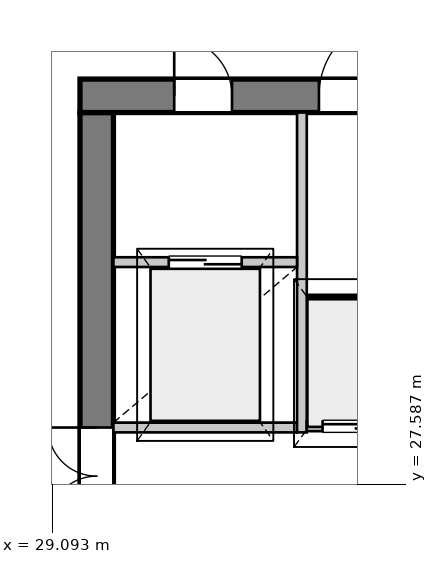
"""IFC4 building model, lengths in metres.
Left out: names, types, materials, properties, quantities, classifications, styles, units other than length and angle.
Written with IfcOpenShell. Run it as: python <this file> out.ifc"""

import sys

from ifc_helpers import new_model, si_unit, direction, frame, frame_2d, origin, place, context, subcontext, project, spatial, rectangle, extrude, source, transform, mapped, element, fill, save


model = new_model("IFC4")
c1 = context("Model", 3, precision=1e-05, world=origin(), true_north=direction((0.0, 1.0)))
c2 = subcontext(c1, "Body", "Model", "MODEL_VIEW")
j1 = project(units=[si_unit("LENGTHUNIT", "METRE"), si_unit("PLANEANGLEUNIT", "RADIAN")], contexts=[c1])
p1 = place(None, origin())
s1 = spatial("IfcSite", under=j1, at=p1, CompositionType="ELEMENT")
p2 = place(p1, origin())
s2 = spatial("IfcBuilding", under=s1, at=p2, CompositionType="ELEMENT")
p3 = place(p2, frame((0.0, 0.0, 167.9)))
s3 = spatial("IfcBuildingStorey", under=s2, at=p3, CompositionType="ELEMENT", Elevation=167.9)
p4 = place(p3, frame((29.825, 19.5, 0.0), z_axis=(0.0, 0.0, 1.0), x_axis=(0.0, 1.0, 0.0)))
e1 = element("IfcWall", 1, at=p4, inside=s3, PredefinedType="SHEAR", context=c2, shape_type="SweptSolid", body=[
    extrude(rectangle(XDim=14.2, YDim=0.55, at=frame_2d((7.1, 0.0))), origin(), (0.0, 0.0, 1.0), 3.33),
])
p5 = place(p4, frame((7.42, 0.0, 0.0)))
e2 = element("IfcOpeningElement", 2, at=p5, cuts=e1, PredefinedType="OPENING", context=c2, shape_type="SweptSolid", body=[
    extrude(rectangle(XDim=1.6, YDim=2.2, at=frame_2d((0.8, 1.1))), frame((0.0, 0.285, 0.0), z_axis=(0.0, -1.0, 0.0), x_axis=(1.0, 0.0, 0.0)), (0.0, 0.0, 1.0), 0.57),
])
p6 = place(p3, frame((29.55, 33.975, 0.0), z_axis=(0.0, 0.0, 1.0), x_axis=(1.0, 0.0, 0.0)))
e3 = element("IfcWall", 3, at=p6, inside=s3, PredefinedType="SHEAR", context=c2, shape_type="SweptSolid", body=[
    extrude(rectangle(XDim=16.9, YDim=0.55, at=frame_2d((8.45, 0.0))), origin(), (0.0, 0.0, 1.0), 3.33),
])
p7 = place(p6, frame((1.55, 0.0, 0.0)))
e4 = element("IfcOpeningElement", 4, at=p7, cuts=e3, PredefinedType="OPENING", context=c2, shape_type="SweptSolid", body=[
    extrude(rectangle(XDim=0.95, YDim=2.1, at=frame_2d((0.475, 1.05))), frame((0.0, 0.285, 0.0), z_axis=(0.0, -1.0, 0.0), x_axis=(1.0, 0.0, 0.0)), (0.0, 0.0, 1.0), 0.57),
])
p8 = place(p6, frame((3.93, 0.0, 0.0)))
e5 = element("IfcOpeningElement", 5, at=p8, cuts=e3, PredefinedType="OPENING", context=c2, shape_type="SweptSolid", body=[
    extrude(rectangle(XDim=1.32, YDim=2.2, at=frame_2d((0.66, 1.1))), frame((0.0, 0.285, 0.0), z_axis=(0.0, -1.0, 0.0), x_axis=(1.0, 0.0, 0.0)), (0.0, 0.0, 1.0), 0.57),
])
p9 = place(p3, frame((33.28, 30.6, 0.0), z_axis=(0.0, 0.0, 1.0), x_axis=(1.0, 0.0, 0.0)))
e6 = element("IfcWall", 6, at=p9, inside=s3, PredefinedType="PARTITIONING", context=c2, shape_type="SweptSolid", body=[
    extrude(rectangle(XDim=7.3, YDim=0.16, at=frame_2d((3.65, 0.0))), origin(), (0.0, 0.0, 1.0), 3.33),
])
p10 = place(p3, frame((30.1, 28.52, 0.0), z_axis=(0.0, 0.0, 1.0), x_axis=(1.0, 0.0, 0.0)))
e7 = element("IfcWall", 7, at=p10, inside=s3, PredefinedType="PARTITIONING", context=c2, shape_type="SweptSolid", body=[
    extrude(rectangle(XDim=3.02, YDim=0.16, at=frame_2d((1.51, 0.0))), origin(), (0.0, 0.0, 1.0), 3.33),
])
p11 = place(p3, frame((33.2, 28.44, 0.0), z_axis=(0.0, 0.0, 1.0), x_axis=(0.0, 1.0, 0.0)))
e8 = element("IfcWall", 8, at=p11, inside=s3, PredefinedType="PARTITIONING", context=c2, shape_type="SweptSolid", body=[
    extrude(rectangle(XDim=5.26, YDim=0.16, at=frame_2d((2.63, 0.0))), origin(), (0.0, 0.0, 1.0), 3.33),
])
p12 = place(p3, frame((30.1, 31.24, 0.0), z_axis=(0.0, 0.0, 1.0), x_axis=(1.0, 0.0, 0.0)))
e9 = element("IfcWall", 9, at=p12, inside=s3, PredefinedType="PARTITIONING", context=c2, shape_type="SweptSolid", body=[
    extrude(rectangle(XDim=3.02, YDim=0.16, at=frame_2d((1.51, 0.0))), origin(), (0.0, 0.0, 1.0), 3.33),
])
p13 = place(p12, frame((0.91, 0.0, 0.0)))
e10 = element("IfcOpeningElement", 10, at=p13, cuts=e9, PredefinedType="OPENING", context=c2, shape_type="SweptSolid", body=[
    extrude(rectangle(XDim=1.2, YDim=2.2, at=frame_2d((0.6, 1.1))), frame((0.0, 0.09, 0.0), z_axis=(0.0, -1.0, 0.0), x_axis=(1.0, 0.0, 0.0)), (0.0, 0.0, 1.0), 0.18),
])
p14 = place(p3, frame((33.28, 28.54, 0.0), z_axis=(0.0, 0.0, 1.0), x_axis=(1.0, 0.0, 0.0)))
e11 = element("IfcWall", 11, at=p14, inside=s3, PredefinedType="PARTITIONING", context=c2, shape_type="SweptSolid", body=[
    extrude(rectangle(XDim=12.62, YDim=0.16, at=frame_2d((6.31, 0.0))), origin(), (0.0, 0.0, 1.0), 3.33),
])
p15 = place(p14, frame((0.26, 0.0, 0.0)))
e12 = element("IfcOpeningElement", 12, at=p15, cuts=e11, PredefinedType="OPENING", context=c2, shape_type="SweptSolid", body=[
    extrude(rectangle(XDim=1.1, YDim=2.2, at=frame_2d((0.55, 1.1))), frame((0.0, 0.09, 0.0), z_axis=(0.0, -1.0, 0.0), x_axis=(1.0, 0.0, 0.0)), (0.0, 0.0, 1.0), 0.18),
])
p16 = place(p14, frame((2.01, 0.0, 0.0)))
e13 = element("IfcOpeningElement", 13, at=p16, cuts=e11, PredefinedType="OPENING", context=c2, shape_type="SweptSolid", body=[
    extrude(rectangle(XDim=1.1, YDim=2.2, at=frame_2d((0.55, 1.1))), frame((0.0, 0.09, 0.0), z_axis=(0.0, -1.0, 0.0), x_axis=(1.0, 0.0, 0.0)), (0.0, 0.0, 1.0), 0.18),
])
p17 = place(p14, frame((3.76, 0.0, 0.0)))
e14 = element("IfcOpeningElement", 14, at=p17, cuts=e11, PredefinedType="OPENING", context=c2, shape_type="SweptSolid", body=[
    extrude(rectangle(XDim=1.1, YDim=2.2, at=frame_2d((0.55, 1.1))), frame((0.0, 0.09, 0.0), z_axis=(0.0, -1.0, 0.0), x_axis=(1.0, 0.0, 0.0)), (0.0, 0.0, 1.0), 0.18),
])
m1 = source(origin(), c2, "Body", "SweptSolid", [
    extrude(rectangle(XDim=1.6, YDim=2.2, at=frame_2d((0.8, 1.1))), frame((0.0, 0.025, 0.0), z_axis=(0.0, -1.0, 0.0), x_axis=(1.0, 0.0, 0.0)), (0.0, 0.0, 1.0), 0.05),
])
p18 = place(p5, origin())
e15 = element("IfcDoor", 15, at=p18, inside=s3, OperationType="DOUBLE_DOOR_SINGLE_SWING", PredefinedType="DOOR", context=c2, shape_type="MappedRepresentation", body=[
    mapped(m1, transform((0.0, 0.0, 0.0), x_axis=(1.0, 0.0, 0.0), y_axis=(0.0, 1.0, 0.0), z_axis=(0.0, 0.0, 1.0), scale=1.0)),
])
fill(e2, e15)
m2 = source(origin(), c2, "Body", "SweptSolid", [
    extrude(rectangle(XDim=0.95, YDim=2.1, at=frame_2d((0.475, 1.05))), frame((0.0, 0.025, 0.0), z_axis=(0.0, -1.0, 0.0), x_axis=(1.0, 0.0, 0.0)), (0.0, 0.0, 1.0), 0.05),
])
p19 = place(p7, origin())
e16 = element("IfcDoor", 16, at=p19, inside=s3, OperationType="SINGLE_SWING_LEFT", PredefinedType="DOOR", context=c2, shape_type="MappedRepresentation", body=[
    mapped(m2, transform((0.0, 0.0, 0.0), x_axis=(1.0, 0.0, 0.0), y_axis=(0.0, 1.0, 0.0), z_axis=(0.0, 0.0, 1.0), scale=1.0)),
])
fill(e4, e16)
m3 = source(origin(), c2, "Body", "SweptSolid", [
    extrude(rectangle(XDim=1.32, YDim=2.2, at=frame_2d((0.66, 1.1))), frame((0.0, 0.025, 0.0), z_axis=(0.0, -1.0, 0.0), x_axis=(1.0, 0.0, 0.0)), (0.0, 0.0, 1.0), 0.05),
])
p20 = place(p8, origin())
e17 = element("IfcDoor", 17, at=p20, inside=s3, OperationType="SINGLE_SWING_RIGHT", PredefinedType="DOOR", context=c2, shape_type="MappedRepresentation", body=[
    mapped(m3, transform((0.0, 0.0, 0.0), x_axis=(1.0, 0.0, 0.0), y_axis=(0.0, 1.0, 0.0), z_axis=(0.0, 0.0, 1.0), scale=1.0)),
])
fill(e5, e17)
m4 = source(origin(), c2, "Body", "SweptSolid", [
    extrude(rectangle(XDim=1.2, YDim=2.2, at=frame_2d((0.6, 1.1))), frame((0.0, 0.025, 0.0), z_axis=(0.0, -1.0, 0.0), x_axis=(1.0, 0.0, 0.0)), (0.0, 0.0, 1.0), 0.05),
])
p21 = place(p13, origin())
e18 = element("IfcDoor", 18, at=p21, inside=s3, OperationType="DOUBLE_DOOR_SLIDING", PredefinedType="DOOR", context=c2, shape_type="MappedRepresentation", body=[
    mapped(m4, transform((0.0, 0.0, 0.0), x_axis=(1.0, 0.0, 0.0), y_axis=(0.0, 1.0, 0.0), z_axis=(0.0, 0.0, 1.0), scale=1.0)),
])
fill(e10, e18)
m5 = source(origin(), c2, "Body", "SweptSolid", [
    extrude(rectangle(XDim=1.1, YDim=2.2, at=frame_2d((0.55, 1.1))), frame((0.0, 0.025, 0.0), z_axis=(0.0, -1.0, 0.0), x_axis=(1.0, 0.0, 0.0)), (0.0, 0.0, 1.0), 0.05),
])
p22 = place(p15, origin())
e19 = element("IfcDoor", 19, at=p22, inside=s3, OperationType="DOUBLE_DOOR_SLIDING", PredefinedType="DOOR", context=c2, shape_type="MappedRepresentation", body=[
    mapped(m5, transform((0.0, 0.0, 0.0), x_axis=(1.0, 0.0, 0.0), y_axis=(0.0, 1.0, 0.0), z_axis=(0.0, 0.0, 1.0), scale=1.0)),
])
fill(e12, e19)
save(model, sys.argv[1])
